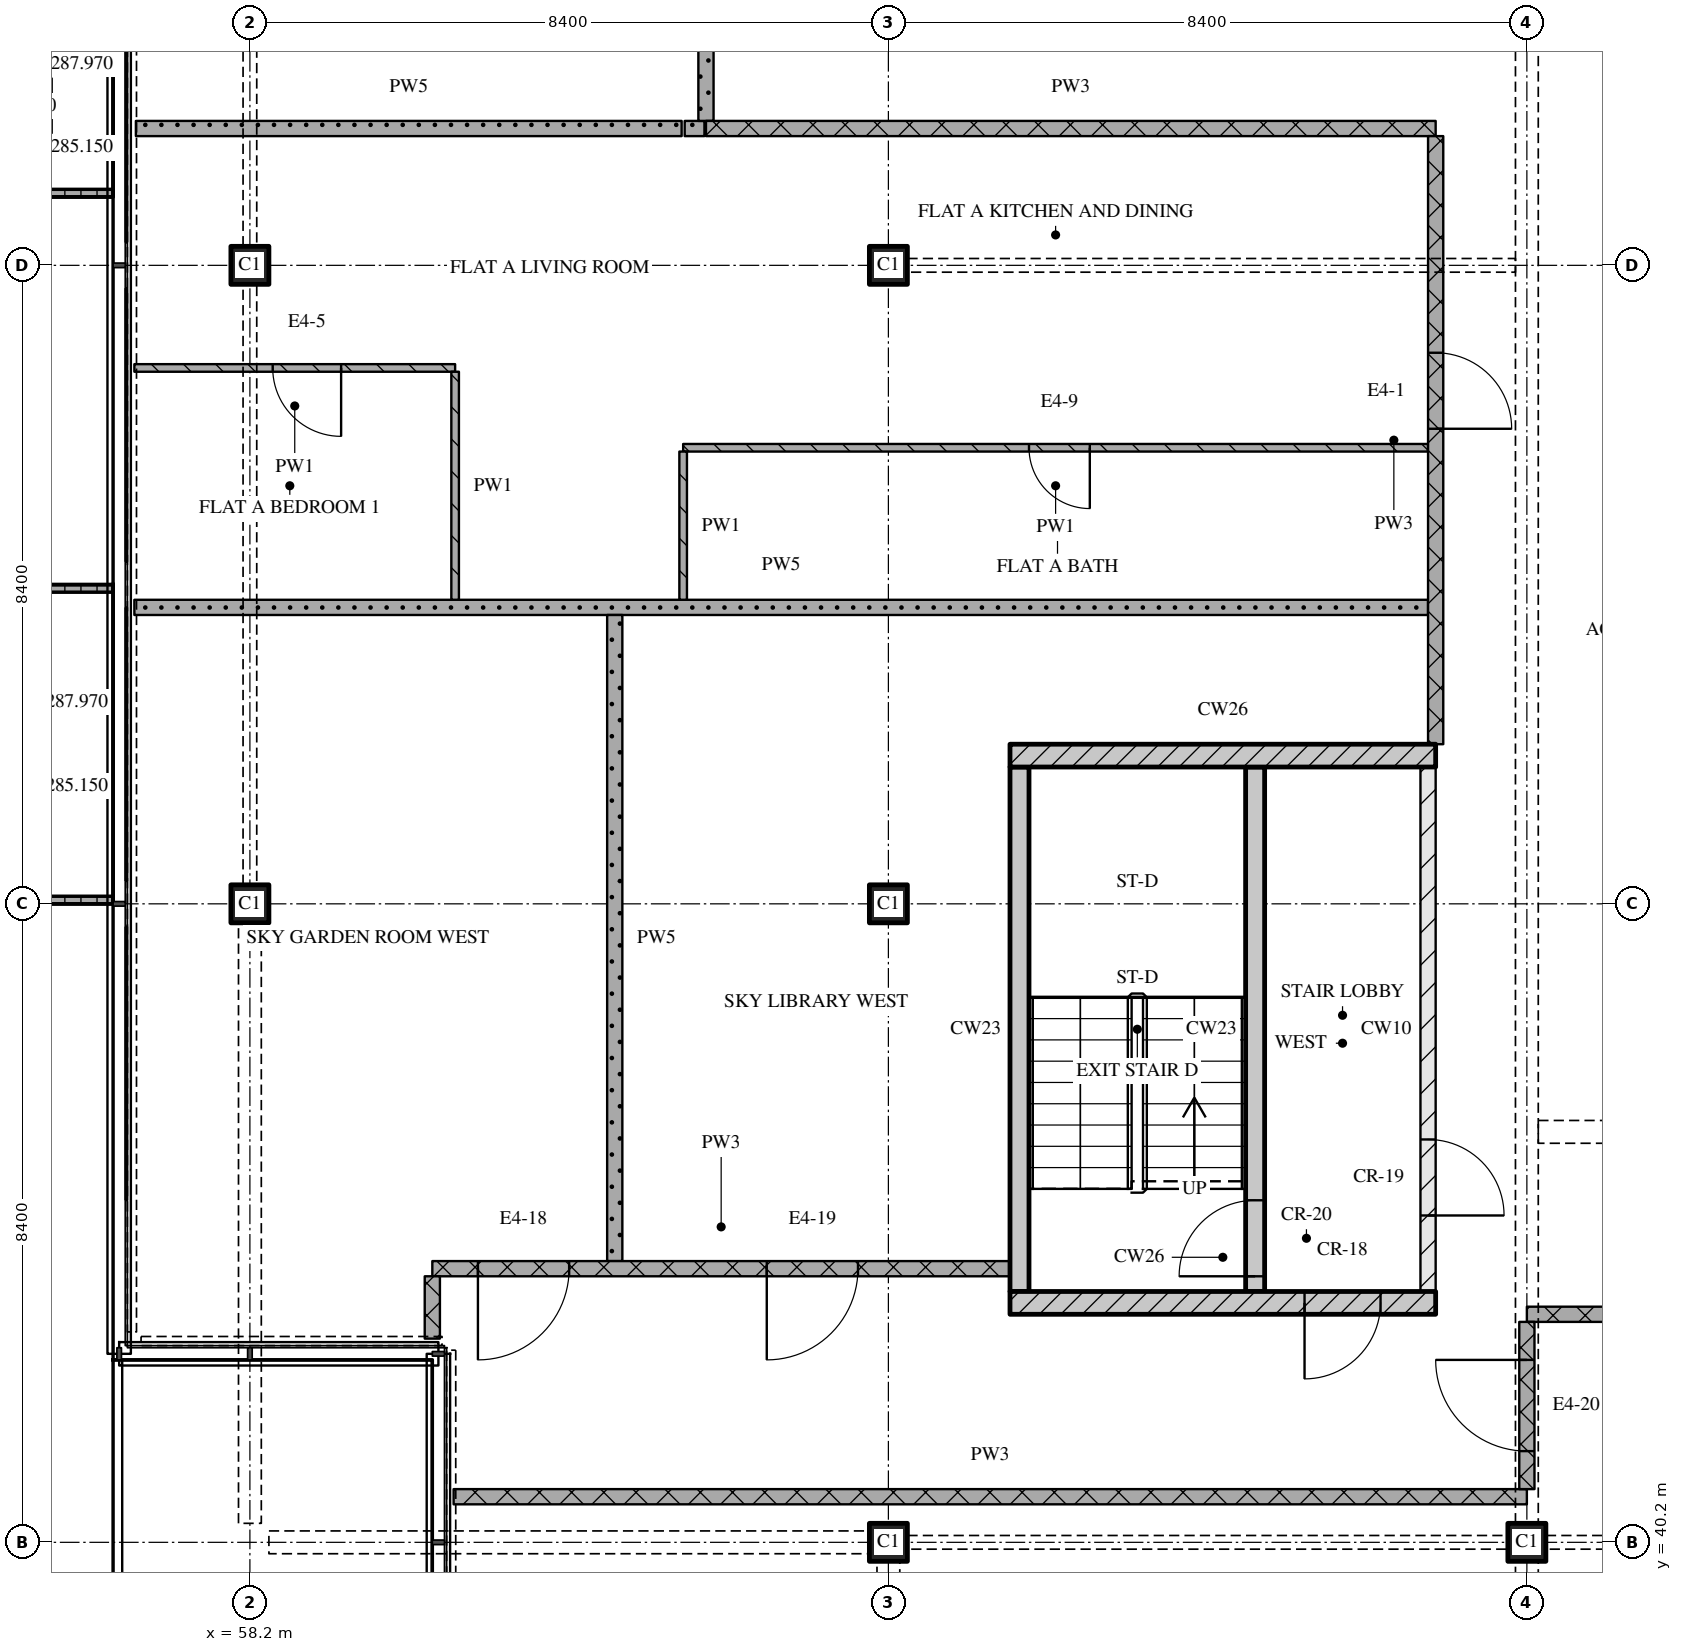
"""IFC4 building model, lengths in metres.
Left out: names, types, materials, properties, quantities, classifications, styles, units other than length and angle.
Written with IfcOpenShell. Run it as: python <this file> out.ifc"""

import sys

from ifc_helpers import new_model, si_unit, direction, frame, frame_2d, origin, origin_2d, place, context, subcontext, project, spatial, polyline, rectangle, outline, extrude, element, fill, save


model = new_model("IFC4")
c1 = context("Model", 3, precision=1e-05, world=origin(), true_north=direction((0.0, 1.0)))
c2 = subcontext(c1, "Body", "Model", "MODEL_VIEW")
j1 = project(units=[si_unit("LENGTHUNIT", "METRE"), si_unit("PLANEANGLEUNIT", "RADIAN")], contexts=[c1])
p1 = place(None, origin())
s1 = spatial("IfcSite", under=j1, at=p1, CompositionType="ELEMENT")
p2 = place(p1, origin())
s2 = spatial("IfcBuilding", under=s1, at=p2, CompositionType="ELEMENT")
p3 = place(p2, frame((0.0, 0.0, 285.15)))
s3 = spatial("IfcBuildingStorey", under=s2, at=p3, CompositionType="ELEMENT", Elevation=285.15)
for number, where, z_axis, x_axis in (
    (1, (58.2, 48.6, 0.0), (0.0, 0.0, 1.0), (1.0, 0.0, 0.0)),
    (2, (58.2, 57.0, 0.0), (0.0, 0.0, 1.0), (1.0, 0.0, 0.0)),
    (3, (66.6, 40.2, 0.0), (0.0, 0.0, 1.0), (1.0, 0.0, 0.0)),
    (4, (66.6, 48.6, 0.0), (0.0, 0.0, 1.0), (1.0, 0.0, 0.0)),
    (5, (66.6, 57.0, 0.0), (0.0, 0.0, 1.0), (1.0, 0.0, 0.0)),
    (6, (75.0, 40.2, 0.0), (0.0, 0.0, 1.0), (1.0, 0.0, 0.0)),
):
    element("IfcColumn", number, at=place(p3, frame(where, z_axis=z_axis, x_axis=x_axis)), inside=s3, PredefinedType="COLUMN", context=c2, shape_type="SweptSolid", body=[
        extrude(rectangle(XDim=0.5, YDim=0.5, at=origin_2d()), origin(), (0.0, 0.0, 1.0), 3.6),
    ])
p4 = place(p3, origin())
e7 = element("IfcWall", 7, at=p4, inside=s3, PredefinedType="SOLIDWALL", context=c2, shape_type="SweptSolid", body=[
    extrude(outline(polyline([(56.4, 60.3), (56.4, 60.2), (54.9, 60.2), (54.9, 58.0), (56.4, 58.0), (56.4, 57.9), (54.8, 57.9), (54.8, 60.3), (56.4, 60.3)])), origin(), (0.0, 0.0, 1.0), 1.0),
])
p5 = place(p3, origin())
e8 = element("IfcWall", 8, at=p5, inside=s3, PredefinedType="SOLIDWALL", context=c2, shape_type="SweptSolid", body=[
    extrude(outline(polyline([(56.4, 52.8), (56.4, 52.7), (54.767, 52.7), (54.767, 48.7), (56.4, 48.7), (56.4, 48.6), (54.667, 48.6), (54.667, 52.8), (56.4, 52.8)])), origin(), (0.0, 0.0, 1.0), 1.0),
])
p6 = place(p3, frame((68.2, 43.35, 0.0), z_axis=(0.0, 0.0, 1.0), x_axis=(1.0, 0.0, 0.0)))
e9 = element("IfcWall", 9, at=p6, inside=s3, PredefinedType="SOLIDWALL", context=c2, shape_type="SweptSolid", body=[
    extrude(rectangle(XDim=5.6, YDim=0.3, at=frame_2d((2.8, 0.0))), origin(), (0.0, 0.0, 1.0), 3.32),
])
p7 = place(p6, frame((3.875, 0.0, 0.0)))
e10 = element("IfcOpeningElement", 10, at=p7, cuts=e9, PredefinedType="OPENING", context=c2, shape_type="SweptSolid", body=[
    extrude(rectangle(XDim=1.0, YDim=2.1, at=frame_2d((0.5, 1.05))), frame((0.0, 0.16, 0.0), z_axis=(0.0, -1.0, 0.0), x_axis=(1.0, 0.0, 0.0)), (0.0, 0.0, 1.0), 0.32),
])
p8 = place(p3, frame((68.325, 43.5, 0.0), z_axis=(0.0, 0.0, 1.0), x_axis=(0.0, 1.0, 0.0)))
e11 = element("IfcWall", 11, at=p8, inside=s3, PredefinedType="SOLIDWALL", context=c2, shape_type="SweptSolid", body=[
    extrude(rectangle(XDim=6.9, YDim=0.25, at=frame_2d((3.45, 0.0))), origin(), (0.0, 0.0, 1.0), 3.32),
])
p9 = place(p3, frame((71.425, 43.5, 0.0), z_axis=(0.0, 0.0, 1.0), x_axis=(0.0, 1.0, 0.0)))
e12 = element("IfcWall", 12, at=p9, inside=s3, PredefinedType="SOLIDWALL", context=c2, shape_type="SweptSolid", body=[
    extrude(rectangle(XDim=6.9, YDim=0.25, at=frame_2d((3.45, 0.0))), origin(), (0.0, 0.0, 1.0), 3.32),
])
p10 = place(p9, frame((0.2, 0.0, 0.0)))
e13 = element("IfcOpeningElement", 13, at=p10, cuts=e12, PredefinedType="OPENING", context=c2, shape_type="SweptSolid", body=[
    extrude(rectangle(XDim=1.0, YDim=2.1, at=frame_2d((0.5, 1.05))), frame((0.0, 0.135, 0.0), z_axis=(0.0, -1.0, 0.0), x_axis=(1.0, 0.0, 0.0)), (0.0, 0.0, 1.0), 0.27),
])
p11 = place(p3, frame((73.7, 43.5, 0.0), z_axis=(0.0, 0.0, 1.0), x_axis=(0.0, 1.0, 0.0)))
e14 = element("IfcWall", 14, at=p11, inside=s3, PredefinedType="PARTITIONING", context=c2, shape_type="SweptSolid", body=[
    extrude(rectangle(XDim=6.9, YDim=0.2, at=frame_2d((3.45, 0.0))), origin(), (0.0, 0.0, 1.0), 3.32),
])
p12 = place(p11, frame((1.0, 0.0, 0.0)))
e15 = element("IfcOpeningElement", 15, at=p12, cuts=e14, PredefinedType="OPENING", context=c2, shape_type="SweptSolid", body=[
    extrude(rectangle(XDim=1.0, YDim=2.1, at=frame_2d((0.5, 1.05))), frame((0.0, 0.11, 0.0), z_axis=(0.0, -1.0, 0.0), x_axis=(1.0, 0.0, 0.0)), (0.0, 0.0, 1.0), 0.22),
])
p13 = place(p3, frame((68.2, 50.55, 0.0), z_axis=(0.0, 0.0, 1.0), x_axis=(1.0, 0.0, 0.0)))
e16 = element("IfcWall", 16, at=p13, inside=s3, PredefinedType="SOLIDWALL", context=c2, shape_type="SweptSolid", body=[
    extrude(rectangle(XDim=5.6, YDim=0.3, at=frame_2d((2.8, 0.0))), origin(), (0.0, 0.0, 1.0), 3.32),
])
p14 = place(p3, frame((60.88, 40.8, 0.0), z_axis=(0.0, 0.0, 1.0), x_axis=(1.0, 0.0, 0.0)))
e17 = element("IfcWall", 17, at=p14, inside=s3, PredefinedType="PARTITIONING", context=c2, shape_type="SweptSolid", body=[
    extrude(rectangle(XDim=14.12, YDim=0.2, at=frame_2d((7.06, 0.0))), origin(), (0.0, 0.0, 1.0), 3.32),
])
p15 = place(p3, frame((100.2, 43.2, 0.0), z_axis=(0.0, 0.0, 1.0), x_axis=(-1.0, 0.0, 0.0)))
e18 = element("IfcWall", 18, at=p15, inside=s3, PredefinedType="PARTITIONING", context=c2, shape_type="SweptSolid", body=[
    extrude(rectangle(XDim=25.2, YDim=0.2, at=frame_2d((12.6, 0.0))), origin(), (0.0, 0.0, 1.0), 3.32),
])
p16 = place(p15, frame((5.7, 0.0, 0.0)))
e19 = element("IfcOpeningElement", 19, at=p16, cuts=e18, PredefinedType="OPENING", context=c2, shape_type="SweptSolid", body=[
    extrude(rectangle(XDim=1.2, YDim=2.1, at=frame_2d((0.6, 1.05))), frame((0.0, 0.11, 0.0), z_axis=(0.0, -1.0, 0.0), x_axis=(1.0, 0.0, 0.0)), (0.0, 0.0, 1.0), 0.22),
])
p17 = place(p15, frame((18.3, 0.0, 0.0)))
e20 = element("IfcOpeningElement", 20, at=p17, cuts=e18, PredefinedType="OPENING", context=c2, shape_type="SweptSolid", body=[
    extrude(rectangle(XDim=1.2, YDim=2.1, at=frame_2d((0.6, 1.05))), frame((0.0, 0.11, 0.0), z_axis=(0.0, -1.0, 0.0), x_axis=(1.0, 0.0, 0.0)), (0.0, 0.0, 1.0), 0.22),
])
p18 = place(p3, frame((60.6, 43.8, 0.0), z_axis=(0.0, 0.0, 1.0), x_axis=(1.0, 0.0, 0.0)))
e21 = element("IfcWall", 21, at=p18, inside=s3, PredefinedType="PARTITIONING", context=c2, shape_type="SweptSolid", body=[
    extrude(rectangle(XDim=7.6, YDim=0.2, at=frame_2d((3.8, 0.0))), origin(), (0.0, 0.0, 1.0), 3.32),
])
p19 = place(p18, frame((0.6, 0.0, 0.0)))
e22 = element("IfcOpeningElement", 22, at=p19, cuts=e21, PredefinedType="OPENING", context=c2, shape_type="SweptSolid", body=[
    extrude(rectangle(XDim=1.2, YDim=2.1, at=frame_2d((0.6, 1.05))), frame((0.0, 0.11, 0.0), z_axis=(0.0, -1.0, 0.0), x_axis=(1.0, 0.0, 0.0)), (0.0, 0.0, 1.0), 0.22),
])
p20 = place(p18, frame((4.4, 0.0, 0.0)))
e23 = element("IfcOpeningElement", 23, at=p20, cuts=e21, PredefinedType="OPENING", context=c2, shape_type="SweptSolid", body=[
    extrude(rectangle(XDim=1.2, YDim=2.1, at=frame_2d((0.6, 1.05))), frame((0.0, 0.11, 0.0), z_axis=(0.0, -1.0, 0.0), x_axis=(1.0, 0.0, 0.0)), (0.0, 0.0, 1.0), 0.22),
])
p21 = place(p3, frame((56.68, 52.5, 0.0), z_axis=(0.0, 0.0, 1.0), x_axis=(1.0, 0.0, 0.0)))
e24 = element("IfcWall", 24, at=p21, inside=s3, PredefinedType="PARTITIONING", context=c2, shape_type="SweptSolid", body=[
    extrude(rectangle(XDim=17.02, YDim=0.2, at=frame_2d((8.51, 0.0))), origin(), (0.0, 0.0, 1.0), 3.32),
])
p22 = place(p3, frame((73.7, 54.6, 0.0), z_axis=(0.0, 0.0, 1.0), x_axis=(-1.0, 0.0, 0.0)))
e25 = element("IfcWall", 25, at=p22, inside=s3, PredefinedType="PARTITIONING", context=c2, shape_type="SweptSolid", body=[
    extrude(rectangle(XDim=9.8, YDim=0.1, at=frame_2d((4.9, 0.0))), origin(), (0.0, 0.0, 1.0), 3.32),
])
p23 = place(p22, frame((4.45, 0.0, 0.0)))
e26 = element("IfcOpeningElement", 26, at=p23, cuts=e25, PredefinedType="OPENING", context=c2, shape_type="SweptSolid", body=[
    extrude(rectangle(XDim=0.8, YDim=2.1, at=frame_2d((0.4, 1.05))), frame((0.0, 0.06, 0.0), z_axis=(0.0, -1.0, 0.0), x_axis=(1.0, 0.0, 0.0)), (0.0, 0.0, 1.0), 0.12),
])
p24 = place(p3, frame((60.9, 55.65, 0.0), z_axis=(0.0, 0.0, 1.0), x_axis=(-1.0, 0.0, 0.0)))
e27 = element("IfcWall", 27, at=p24, inside=s3, PredefinedType="PARTITIONING", context=c2, shape_type="SweptSolid", body=[
    extrude(rectangle(XDim=4.22, YDim=0.1, at=frame_2d((2.11, 0.0))), origin(), (0.0, 0.0, 1.0), 3.32),
])
p25 = place(p24, frame((1.5, 0.0, 0.0)))
e28 = element("IfcOpeningElement", 28, at=p25, cuts=e27, PredefinedType="OPENING", context=c2, shape_type="SweptSolid", body=[
    extrude(rectangle(XDim=0.9, YDim=2.1, at=frame_2d((0.45, 1.05))), frame((0.0, 0.06, 0.0), z_axis=(0.0, -1.0, 0.0), x_axis=(1.0, 0.0, 0.0)), (0.0, 0.0, 1.0), 0.12),
])
p26 = place(p3, frame((64.2, 58.8, 0.0), z_axis=(0.0, 0.0, 1.0), x_axis=(1.0, 0.0, 0.0)))
e29 = element("IfcWall", 29, at=p26, inside=s3, PredefinedType="PARTITIONING", context=c2, shape_type="SweptSolid", body=[
    extrude(rectangle(XDim=9.6, YDim=0.2, at=frame_2d((4.8, 0.0))), origin(), (0.0, 0.0, 1.0), 3.32),
])
p27 = place(p3, frame((56.7, 58.8, 0.0), z_axis=(0.0, 0.0, 1.0), x_axis=(1.0, 0.0, 0.0)))
e30 = element("IfcWall", 30, at=p27, inside=s3, PredefinedType="PARTITIONING", context=c2, shape_type="SweptSolid", body=[
    extrude(rectangle(XDim=7.18, YDim=0.2, at=frame_2d((3.59, 0.0))), origin(), (0.0, 0.0, 1.0), 3.32),
])
p28 = place(p3, frame((63.92, 58.8, 0.0), z_axis=(0.0, 0.0, 1.0), x_axis=(1.0, 0.0, 0.0)))
e31 = element("IfcWall", 31, at=p28, inside=s3, PredefinedType="PARTITIONING", context=c2, shape_type="SweptSolid", body=[
    extrude(rectangle(XDim=0.26, YDim=0.2, at=frame_2d((0.13, 0.0))), origin(), (0.0, 0.0, 1.0), 3.32),
])
p29 = place(p3, frame((60.6, 43.7, 0.0), z_axis=(0.0, 0.0, 1.0), x_axis=(0.0, -1.0, 0.0)))
e32 = element("IfcWall", 32, at=p29, inside=s3, PredefinedType="PARTITIONING", context=c2, shape_type="SweptSolid", body=[
    extrude(rectangle(XDim=0.82, YDim=0.2, at=frame_2d((0.41, 0.0))), origin(), (0.0, 0.0, 1.0), 3.32),
])
p30 = place(p3, frame((60.9, 55.6, 0.0), z_axis=(0.0, 0.0, 1.0), x_axis=(0.0, -1.0, 0.0)))
e33 = element("IfcWall", 33, at=p30, inside=s3, PredefinedType="PARTITIONING", context=c2, shape_type="SweptSolid", body=[
    extrude(rectangle(XDim=3.0, YDim=0.1, at=frame_2d((1.5, 0.0))), origin(), (0.0, 0.0, 1.0), 3.32),
])
p31 = place(p3, frame((63.0, 52.4, 0.0), z_axis=(0.0, 0.0, 1.0), x_axis=(0.0, -1.0, 0.0)))
e34 = element("IfcWall", 34, at=p31, inside=s3, PredefinedType="PARTITIONING", context=c2, shape_type="SweptSolid", body=[
    extrude(rectangle(XDim=8.5, YDim=0.2, at=frame_2d((4.25, 0.0))), origin(), (0.0, 0.0, 1.0), 3.32),
])
p32 = place(p3, frame((63.9, 54.55, 0.0), z_axis=(0.0, 0.0, 1.0), x_axis=(0.0, -1.0, 0.0)))
e35 = element("IfcWall", 35, at=p32, inside=s3, PredefinedType="PARTITIONING", context=c2, shape_type="SweptSolid", body=[
    extrude(rectangle(XDim=1.95, YDim=0.1, at=frame_2d((0.975, 0.0))), origin(), (0.0, 0.0, 1.0), 3.32),
])
p33 = place(p3, frame((64.2, 61.1, 0.0), z_axis=(0.0, 0.0, 1.0), x_axis=(0.0, -1.0, 0.0)))
e36 = element("IfcWall", 36, at=p33, inside=s3, PredefinedType="PARTITIONING", context=c2, shape_type="SweptSolid", body=[
    extrude(rectangle(XDim=2.2, YDim=0.2, at=frame_2d((1.1, 0.0))), origin(), (0.0, 0.0, 1.0), 3.32),
])
p34 = place(p3, frame((73.8, 50.7, 0.0), z_axis=(0.0, 0.0, 1.0), x_axis=(0.0, 1.0, 0.0)))
e37 = element("IfcWall", 37, at=p34, inside=s3, PredefinedType="PARTITIONING", context=c2, shape_type="SweptSolid", body=[
    extrude(rectangle(XDim=8.0, YDim=0.2, at=frame_2d((4.0, 0.0))), origin(), (0.0, 0.0, 1.0), 3.32),
])
p35 = place(p34, frame((4.15, 0.0, 0.0)))
e38 = element("IfcOpeningElement", 38, at=p35, cuts=e37, PredefinedType="OPENING", context=c2, shape_type="SweptSolid", body=[
    extrude(rectangle(XDim=1.0, YDim=2.1, at=frame_2d((0.5, 1.05))), frame((0.0, 0.11, 0.0), z_axis=(0.0, -1.0, 0.0), x_axis=(1.0, 0.0, 0.0)), (0.0, 0.0, 1.0), 0.22),
])
p36 = place(p3, frame((75.0, 43.1, 0.0), z_axis=(0.0, 0.0, 1.0), x_axis=(0.0, -1.0, 0.0)))
e39 = element("IfcWall", 39, at=p36, inside=s3, PredefinedType="PARTITIONING", context=c2, shape_type="SweptSolid", body=[
    extrude(rectangle(XDim=2.2, YDim=0.2, at=frame_2d((1.1, 0.0))), origin(), (0.0, 0.0, 1.0), 2.53),
])
p37 = place(p36, frame((0.5, 0.0, 0.0)))
e40 = element("IfcOpeningElement", 40, at=p37, cuts=e39, PredefinedType="OPENING", context=c2, shape_type="SweptSolid", body=[
    extrude(rectangle(XDim=1.2, YDim=2.1, at=frame_2d((0.6, 1.05))), frame((0.0, 0.11, 0.0), z_axis=(0.0, -1.0, 0.0), x_axis=(1.0, 0.0, 0.0)), (0.0, 0.0, 1.0), 0.22),
])
p38 = place(p7, origin())
e41 = element("IfcDoor", 41, at=p38, inside=s3, OperationType="SINGLE_SWING_RIGHT", PredefinedType="DOOR", context=c2, shape_type="SweptSolid", body=[
    extrude(rectangle(XDim=1.0, YDim=2.1, at=frame_2d((0.5, 1.05))), frame((0.0, 0.025, 0.0), z_axis=(0.0, -1.0, 0.0), x_axis=(1.0, 0.0, 0.0)), (0.0, 0.0, 1.0), 0.05),
])
fill(e10, e41)
p39 = place(p10, origin())
e42 = element("IfcDoor", 42, at=p39, inside=s3, OperationType="SINGLE_SWING_LEFT", PredefinedType="DOOR", context=c2, shape_type="SweptSolid", body=[
    extrude(rectangle(XDim=1.0, YDim=2.1, at=frame_2d((0.5, 1.05))), frame((0.0, 0.025, 0.0), z_axis=(0.0, -1.0, 0.0), x_axis=(1.0, 0.0, 0.0)), (0.0, 0.0, 1.0), 0.05),
])
fill(e13, e42)
p40 = place(p12, origin())
e43 = element("IfcDoor", 43, at=p40, inside=s3, OperationType="SINGLE_SWING_RIGHT", PredefinedType="DOOR", context=c2, shape_type="SweptSolid", body=[
    extrude(rectangle(XDim=1.0, YDim=2.1, at=frame_2d((0.5, 1.05))), frame((0.0, 0.025, 0.0), z_axis=(0.0, -1.0, 0.0), x_axis=(1.0, 0.0, 0.0)), (0.0, 0.0, 1.0), 0.05),
])
fill(e15, e43)
p41 = place(p19, origin())
e44 = element("IfcDoor", 44, at=p41, inside=s3, OperationType="SINGLE_SWING_RIGHT", PredefinedType="DOOR", context=c2, shape_type="SweptSolid", body=[
    extrude(rectangle(XDim=1.2, YDim=2.1, at=frame_2d((0.6, 1.05))), frame((0.0, 0.025, 0.0), z_axis=(0.0, -1.0, 0.0), x_axis=(1.0, 0.0, 0.0)), (0.0, 0.0, 1.0), 0.05),
])
fill(e22, e44)
p42 = place(p20, origin())
e45 = element("IfcDoor", 45, at=p42, inside=s3, OperationType="SINGLE_SWING_RIGHT", PredefinedType="DOOR", context=c2, shape_type="SweptSolid", body=[
    extrude(rectangle(XDim=1.2, YDim=2.1, at=frame_2d((0.6, 1.05))), frame((0.0, 0.025, 0.0), z_axis=(0.0, -1.0, 0.0), x_axis=(1.0, 0.0, 0.0)), (0.0, 0.0, 1.0), 0.05),
])
fill(e23, e45)
p43 = place(p23, origin())
e46 = element("IfcDoor", 46, at=p43, inside=s3, OperationType="SINGLE_SWING_LEFT", PredefinedType="DOOR", context=c2, shape_type="SweptSolid", body=[
    extrude(rectangle(XDim=0.8, YDim=2.1, at=frame_2d((0.4, 1.05))), frame((0.0, 0.025, 0.0), z_axis=(0.0, -1.0, 0.0), x_axis=(1.0, 0.0, 0.0)), (0.0, 0.0, 1.0), 0.05),
])
fill(e26, e46)
p44 = place(p25, origin())
e47 = element("IfcDoor", 47, at=p44, inside=s3, OperationType="SINGLE_SWING_LEFT", PredefinedType="DOOR", context=c2, shape_type="SweptSolid", body=[
    extrude(rectangle(XDim=0.9, YDim=2.1, at=frame_2d((0.45, 1.05))), frame((0.0, 0.025, 0.0), z_axis=(0.0, -1.0, 0.0), x_axis=(1.0, 0.0, 0.0)), (0.0, 0.0, 1.0), 0.05),
])
fill(e28, e47)
p45 = place(p35, origin())
e48 = element("IfcDoor", 48, at=p45, inside=s3, OperationType="SINGLE_SWING_RIGHT", PredefinedType="DOOR", context=c2, shape_type="SweptSolid", body=[
    extrude(rectangle(XDim=1.0, YDim=2.1, at=frame_2d((0.5, 1.05))), frame((0.0, 0.025, 0.0), z_axis=(0.0, -1.0, 0.0), x_axis=(1.0, 0.0, 0.0)), (0.0, 0.0, 1.0), 0.05),
])
fill(e38, e48)
p46 = place(p37, origin())
e49 = element("IfcDoor", 49, at=p46, inside=s3, OperationType="SINGLE_SWING_RIGHT", PredefinedType="DOOR", context=c2, shape_type="SweptSolid", body=[
    extrude(rectangle(XDim=1.2, YDim=2.1, at=frame_2d((0.6, 1.05))), frame((0.0, 0.025, 0.0), z_axis=(0.0, -1.0, 0.0), x_axis=(1.0, 0.0, 0.0)), (0.0, 0.0, 1.0), 0.05),
])
fill(e40, e49)
save(model, sys.argv[1])
